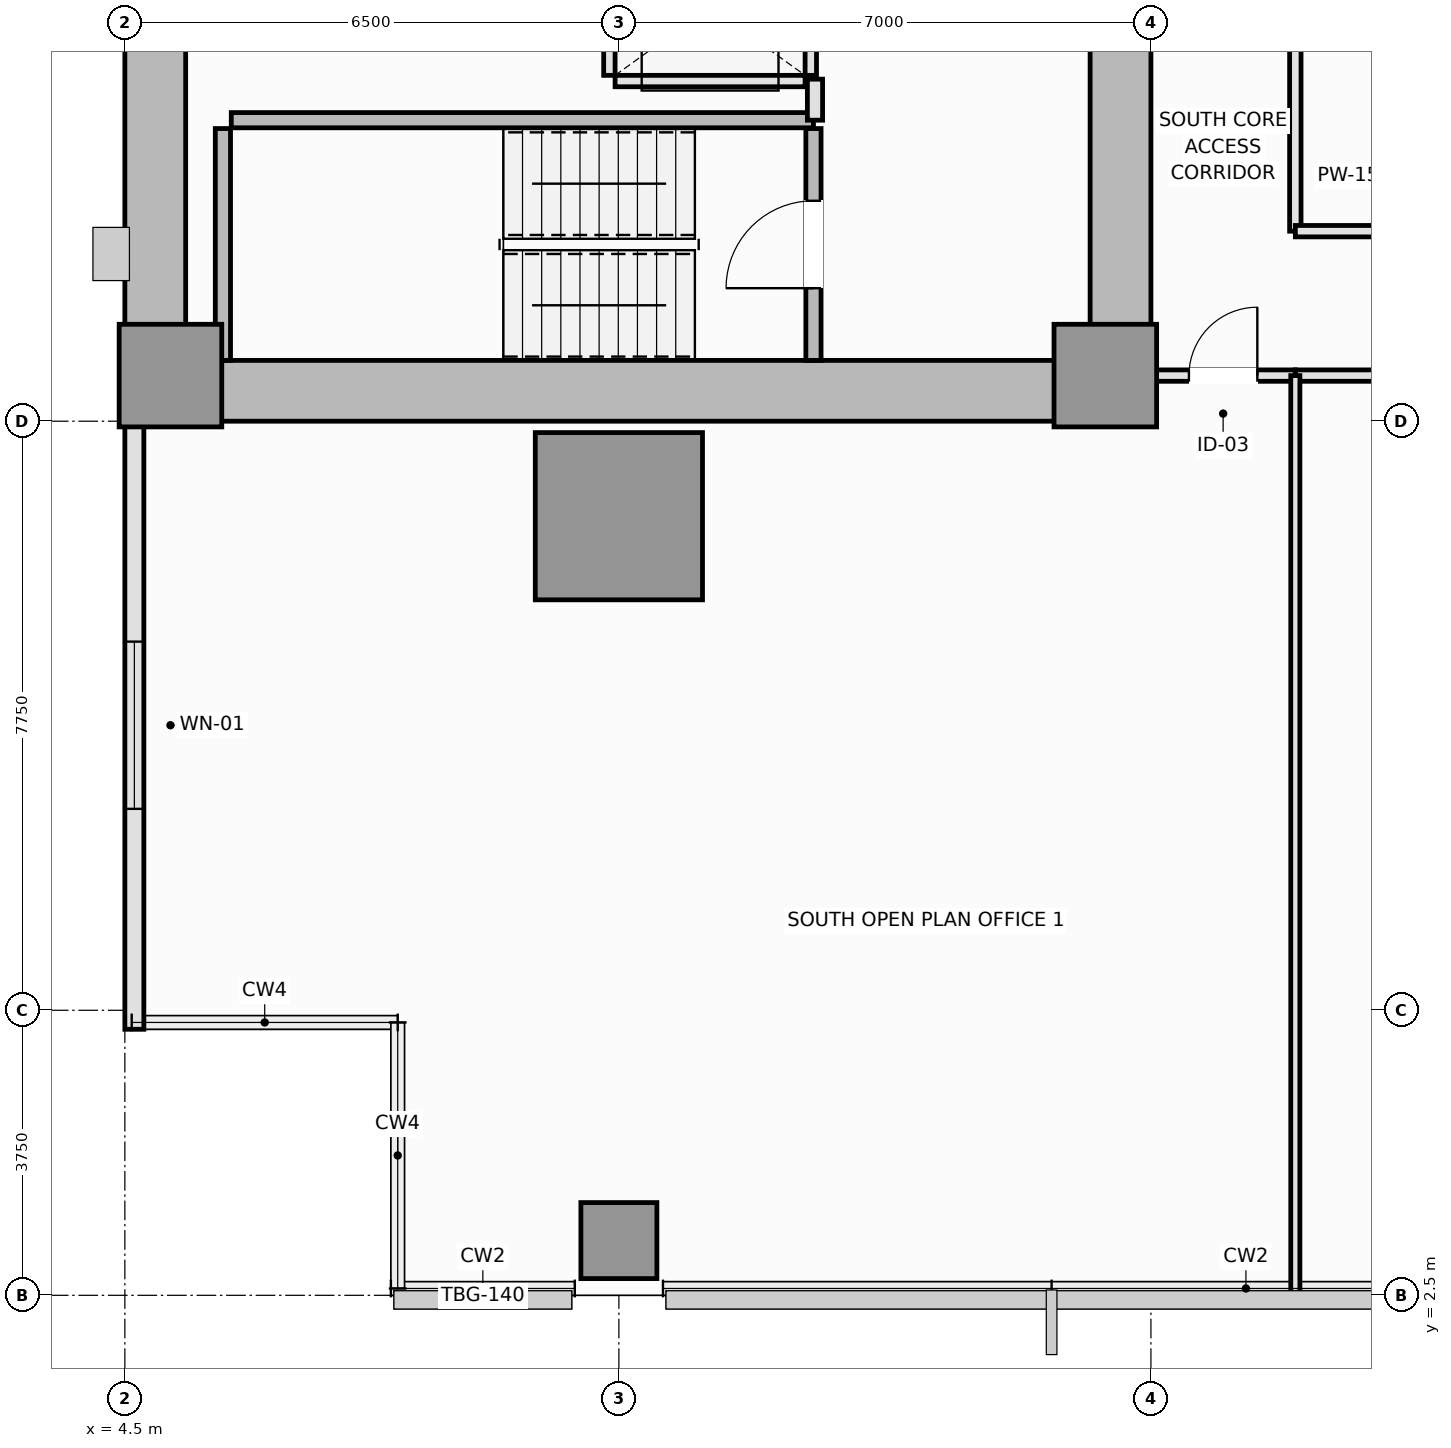
"""IFC4 building model, lengths in metres.
Left out: names, types, materials, properties, quantities, classifications, styles, units other than length and angle.
Written with IfcOpenShell. Run it as: python <this file> out.ifc"""

import sys

from ifc_helpers import new_model, si_unit, direction, frame, frame_2d, origin, origin_2d, place, context, subcontext, project, spatial, rectangle, extrude, element, fill, save


model = new_model("IFC4")
c1 = context("Model", 3, precision=1e-05, world=origin(), true_north=direction((0.0, 1.0)))
c2 = subcontext(c1, "Body", "Model", "MODEL_VIEW")
j1 = project(units=[si_unit("LENGTHUNIT", "METRE"), si_unit("PLANEANGLEUNIT", "RADIAN")], contexts=[c1])
p1 = place(None, origin())
s1 = spatial("IfcSite", under=j1, at=p1, CompositionType="ELEMENT")
p2 = place(p1, origin())
s2 = spatial("IfcBuilding", under=s1, at=p2, CompositionType="ELEMENT")
p3 = place(p2, frame((0.0, 0.0, 61.1)))
s3 = spatial("IfcBuildingStorey", under=s2, at=p3, CompositionType="ELEMENT", Elevation=61.1)
p4 = place(p3, frame((4.5, 14.4, 0.0), z_axis=(0.0, 0.0, 1.0), x_axis=(1.0, 0.0, 0.0)))
e1 = element("IfcWall", 1, at=p4, inside=s3, PredefinedType="SHEAR", context=c2, shape_type="SweptSolid", body=[
    extrude(rectangle(XDim=13.5, YDim=0.8, at=frame_2d((6.75, 0.0))), origin(), (0.0, 0.0, 1.0), 3.55),
])
p5 = place(p3, frame((4.9, 14.8, 0.0), z_axis=(0.0, 0.0, 1.0), x_axis=(0.0, 1.0, 0.0)))
e2 = element("IfcWall", 2, at=p5, inside=s3, PredefinedType="SHEAR", context=c2, shape_type="SweptSolid", body=[
    extrude(rectangle(XDim=20.9, YDim=0.8, at=frame_2d((10.45, 0.0))), origin(), (0.0, 0.0, 1.0), 3.55),
])
p6 = place(p3, frame((17.6, 14.8, 0.0), z_axis=(0.0, 0.0, 1.0), x_axis=(0.0, 1.0, 0.0)))
e3 = element("IfcWall", 3, at=p6, inside=s3, PredefinedType="SHEAR", context=c2, shape_type="SweptSolid", body=[
    extrude(rectangle(XDim=8.65, YDim=0.8, at=frame_2d((4.325, 0.0))), origin(), (0.0, 0.0, 1.0), 3.55),
])
p7 = place(p6, frame((4.1, 0.0, 0.0)))
e4 = element("IfcOpeningElement", 4, at=p7, cuts=e3, PredefinedType="OPENING", context=c2, shape_type="SweptSolid", body=[
    extrude(rectangle(XDim=1.1, YDim=2.15, at=frame_2d((0.55, 1.075))), frame((0.0, 0.41, 0.0), z_axis=(0.0, -1.0, 0.0), x_axis=(1.0, 0.0, 0.0)), (0.0, 0.0, 1.0), 0.82),
])
for number, where, z_axis, x_axis in (
    (5, (5.1, 14.6, 0.0), (0.0, 0.0, 1.0), (1.0, 0.0, 0.0)),
    (6, (17.4, 14.6, 0.0), (0.0, 0.0, 1.0), (1.0, 0.0, 0.0)),
):
    element("IfcColumn", number, at=place(p3, frame(where, z_axis=z_axis, x_axis=x_axis)), inside=s3, PredefinedType="PILASTER", context=c2, shape_type="SweptSolid", body=[
        extrude(rectangle(XDim=1.35, YDim=1.35, at=origin_2d()), origin(), (0.0, 0.0, 1.0), 3.55),
    ])
p8 = place(p3, frame((11.0, 12.75, 0.0), z_axis=(0.0, 0.0, 1.0), x_axis=(1.0, 0.0, 0.0)))
e7 = element("IfcColumn", 7, at=p8, inside=s3, PredefinedType="COLUMN", context=c2, shape_type="SweptSolid", body=[
    extrude(rectangle(XDim=2.2, YDim=2.2, at=origin_2d()), origin(), (0.0, 0.0, 1.0), 3.55),
])
p9 = place(p3, frame((11.0, 3.22, 0.0), z_axis=(0.0, 0.0, 1.0), x_axis=(1.0, 0.0, 0.0)))
e8 = element("IfcColumn", 8, at=p9, inside=s3, PredefinedType="COLUMN", context=c2, shape_type="SweptSolid", body=[
    extrude(rectangle(XDim=1.0, YDim=1.0, at=origin_2d()), origin(), (0.0, 0.0, 1.0), 3.55),
])
p10 = place(p3, frame((4.625, 14.0, 0.0), z_axis=(0.0, 0.0, 1.0), x_axis=(0.0, -1.0, 0.0)))
e9 = element("IfcWall", 9, at=p10, inside=s3, PredefinedType="SOLIDWALL", context=c2, shape_type="SweptSolid", body=[
    extrude(rectangle(XDim=8.0, YDim=0.25, at=frame_2d((4.0, 0.0))), origin(), (0.0, 0.0, 1.0), 3.37),
])
p11 = place(p10, frame((2.9, 0.0, 0.9)))
e10 = element("IfcOpeningElement", 10, at=p11, cuts=e9, PredefinedType="OPENING", context=c2, shape_type="SweptSolid", body=[
    extrude(rectangle(XDim=2.2, YDim=1.8, at=frame_2d((1.1, 0.9))), frame((0.0, 0.135, 0.0), z_axis=(0.0, -1.0, 0.0), x_axis=(1.0, 0.0, 0.0)), (0.0, 0.0, 1.0), 0.27),
])
p12 = place(p3, frame((5.79, 14.8, 0.0), z_axis=(0.0, 0.0, 1.0), x_axis=(0.0, 1.0, 0.0)))
e11 = element("IfcWall", 11, at=p12, inside=s3, PredefinedType="SOLIDWALL", context=c2, shape_type="SweptSolid", body=[
    extrude(rectangle(XDim=3.05, YDim=0.2, at=frame_2d((1.525, 0.0))), origin(), (0.0, 0.0, 1.0), 3.55),
])
p13 = place(p3, frame((5.9, 17.96, 0.0), z_axis=(0.0, 0.0, 1.0), x_axis=(1.0, 0.0, 0.0)))
e12 = element("IfcWall", 12, at=p13, inside=s3, PredefinedType="SOLIDWALL", context=c2, shape_type="SweptSolid", body=[
    extrude(rectangle(XDim=7.66, YDim=0.2, at=frame_2d((3.83, 0.0))), origin(), (0.0, 0.0, 1.0), 3.55),
])
p14 = place(p3, frame((13.56, 14.8, 0.0), z_axis=(0.0, 0.0, 1.0), x_axis=(0.0, 1.0, 0.0)))
e13 = element("IfcWall", 13, at=p14, inside=s3, PredefinedType="SOLIDWALL", context=c2, shape_type="SweptSolid", body=[
    extrude(rectangle(XDim=3.05, YDim=0.2, at=frame_2d((1.525, 0.0))), origin(), (0.0, 0.0, 1.0), 3.55),
])
p15 = place(p14, frame((0.95, 0.0, 0.0)))
e14 = element("IfcOpeningElement", 14, at=p15, cuts=e13, PredefinedType="OPENING", context=c2, shape_type="SweptSolid", body=[
    extrude(rectangle(XDim=1.15, YDim=2.15, at=frame_2d((0.575, 1.075))), frame((0.0, 0.11, 0.0), z_axis=(0.0, -1.0, 0.0), x_axis=(1.0, 0.0, 0.0)), (0.0, 0.0, 1.0), 0.22),
])
p16 = place(p3, frame((10.95, 18.475, 0.0), z_axis=(0.0, 0.0, 1.0), x_axis=(1.0, 0.0, 0.0)))
e15 = element("IfcWall", 15, at=p16, inside=s3, PredefinedType="PARTITIONING", context=c2, shape_type="SweptSolid", body=[
    extrude(rectangle(XDim=2.5, YDim=0.15, at=frame_2d((1.25, 0.0))), origin(), (0.0, 0.0, 1.0), 3.37),
])
p17 = place(p3, frame((10.875, 18.55, 0.0), z_axis=(0.0, 0.0, 1.0), x_axis=(0.0, 1.0, 0.0)))
e16 = element("IfcWall", 16, at=p17, inside=s3, PredefinedType="PARTITIONING", context=c2, shape_type="SweptSolid", body=[
    extrude(rectangle(XDim=1.8, YDim=0.15, at=frame_2d((0.9, 0.0))), origin(), (0.0, 0.0, 1.0), 3.37),
])
p18 = place(p3, frame((13.525, 18.55, 0.0), z_axis=(0.0, 0.0, 1.0), x_axis=(0.0, 1.0, 0.0)))
e17 = element("IfcWall", 17, at=p18, inside=s3, PredefinedType="PARTITIONING", context=c2, shape_type="SweptSolid", body=[
    extrude(rectangle(XDim=1.8, YDim=0.15, at=frame_2d((0.9, 0.0))), origin(), (0.0, 0.0, 1.0), 3.37),
])
p19 = place(p18, frame((0.35, 0.0, 0.0)))
e18 = element("IfcOpeningElement", 18, at=p19, cuts=e17, PredefinedType="OPENING", context=c2, shape_type="SweptSolid", body=[
    extrude(rectangle(XDim=1.1, YDim=2.2, at=frame_2d((0.55, 1.1))), frame((0.0, 0.085, 0.0), z_axis=(0.0, -1.0, 0.0), x_axis=(1.0, 0.0, 0.0)), (0.0, 0.0, 1.0), 0.17),
])
p20 = place(p3, frame((13.58, 17.96, 0.0), z_axis=(0.0, 0.0, 1.0), x_axis=(0.0, 1.0, 0.0)))
e19 = element("IfcWall", 19, at=p20, inside=s3, PredefinedType="PARTITIONING", context=c2, shape_type="SweptSolid", body=[
    extrude(rectangle(XDim=0.54, YDim=0.2, at=frame_2d((0.27, 0.0))), origin(), (0.0, 0.0, 1.0), 3.37),
])
p21 = place(p3, frame((19.9, 16.5, 0.0), z_axis=(0.0, 0.0, 1.0), x_axis=(0.0, 1.0, 0.0)))
e20 = element("IfcWall", 20, at=p21, inside=s3, PredefinedType="PARTITIONING", context=c2, shape_type="SweptSolid", body=[
    extrude(rectangle(XDim=4.25, YDim=0.15, at=frame_2d((2.125, 0.0))), origin(), (0.0, 0.0, 1.0), 3.37),
])
p22 = place(p3, frame((19.9, 16.5, 0.0), z_axis=(0.0, 0.0, 1.0), x_axis=(1.0, 0.0, 0.0)))
e21 = element("IfcWall", 21, at=p22, inside=s3, PredefinedType="PARTITIONING", context=c2, shape_type="SweptSolid", body=[
    extrude(rectangle(XDim=2.65, YDim=0.15, at=frame_2d((1.325, 0.0))), origin(), (0.0, 0.0, 1.0), 3.37),
])
p23 = place(p3, frame((18.0, 14.6, 0.0), z_axis=(0.0, 0.0, 1.0), x_axis=(1.0, 0.0, 0.0)))
e22 = element("IfcWall", 22, at=p23, inside=s3, PredefinedType="PARTITIONING", context=c2, shape_type="SweptSolid", body=[
    extrude(rectangle(XDim=1.9, YDim=0.15, at=frame_2d((0.95, 0.0))), origin(), (0.0, 0.0, 1.0), 3.37),
])
p24 = place(p23, frame((0.5, 0.0, 0.0)))
e23 = element("IfcOpeningElement", 23, at=p24, cuts=e22, PredefinedType="OPENING", context=c2, shape_type="SweptSolid", body=[
    extrude(rectangle(XDim=0.9, YDim=2.1, at=frame_2d((0.45, 1.05))), frame((0.0, 0.085, 0.0), z_axis=(0.0, -1.0, 0.0), x_axis=(1.0, 0.0, 0.0)), (0.0, 0.0, 1.0), 0.17),
])
p25 = place(p3, frame((19.9, 14.6, 0.0), z_axis=(0.0, 0.0, 1.0), x_axis=(1.0, 0.0, 0.0)))
e24 = element("IfcWall", 24, at=p25, inside=s3, PredefinedType="PARTITIONING", context=c2, shape_type="SweptSolid", body=[
    extrude(rectangle(XDim=3.7, YDim=0.15, at=frame_2d((1.85, 0.0))), origin(), (0.0, 0.0, 1.0), 3.37),
])
p26 = place(p25, frame((1.35, 0.0, 0.0)))
e25 = element("IfcOpeningElement", 25, at=p26, cuts=e24, PredefinedType="OPENING", context=c2, shape_type="SweptSolid", body=[
    extrude(rectangle(XDim=1.0, YDim=2.15, at=frame_2d((0.5, 1.075))), frame((0.0, 0.085, 0.0), z_axis=(0.0, -1.0, 0.0), x_axis=(1.0, 0.0, 0.0)), (0.0, 0.0, 1.0), 0.17),
])
p27 = place(p3, frame((19.9, 2.51, 0.0), z_axis=(0.0, 0.0, 1.0), x_axis=(0.0, 1.0, 0.0)))
e26 = element("IfcWall", 26, at=p27, inside=s3, PredefinedType="PARTITIONING", context=c2, shape_type="SweptSolid", body=[
    extrude(rectangle(XDim=12.09, YDim=0.12, at=frame_2d((6.045, 0.0))), origin(), (0.0, 0.0, 1.0), 3.37),
])
p28 = place(p11, origin())
e27 = element("IfcWindow", 27, at=p28, inside=s3, PartitioningType="SINGLE_PANEL", PredefinedType="WINDOW", context=c2, shape_type="SweptSolid", body=[
    extrude(rectangle(XDim=2.2, YDim=1.8, at=frame_2d((1.1, 0.9))), frame((0.0, 0.03, 0.0), z_axis=(0.0, -1.0, 0.0), x_axis=(1.0, 0.0, 0.0)), (0.0, 0.0, 1.0), 0.06),
])
fill(e10, e27)
p29 = place(p15, origin())
e28 = element("IfcDoor", 28, at=p29, inside=s3, OperationType="SINGLE_SWING_LEFT", PredefinedType="DOOR", context=c2, shape_type="SweptSolid", body=[
    extrude(rectangle(XDim=1.15, YDim=2.15, at=frame_2d((0.575, 1.075))), frame((0.0, 0.025, 0.0), z_axis=(0.0, -1.0, 0.0), x_axis=(1.0, 0.0, 0.0)), (0.0, 0.0, 1.0), 0.05),
])
fill(e14, e28)
p30 = place(p24, origin())
e29 = element("IfcDoor", 29, at=p30, inside=s3, OperationType="SINGLE_SWING_RIGHT", PredefinedType="DOOR", context=c2, shape_type="SweptSolid", body=[
    extrude(rectangle(XDim=0.9, YDim=2.1, at=frame_2d((0.45, 1.05))), frame((0.0, 0.025, 0.0), z_axis=(0.0, -1.0, 0.0), x_axis=(1.0, 0.0, 0.0)), (0.0, 0.0, 1.0), 0.05),
])
fill(e23, e29)
save(model, sys.argv[1])
